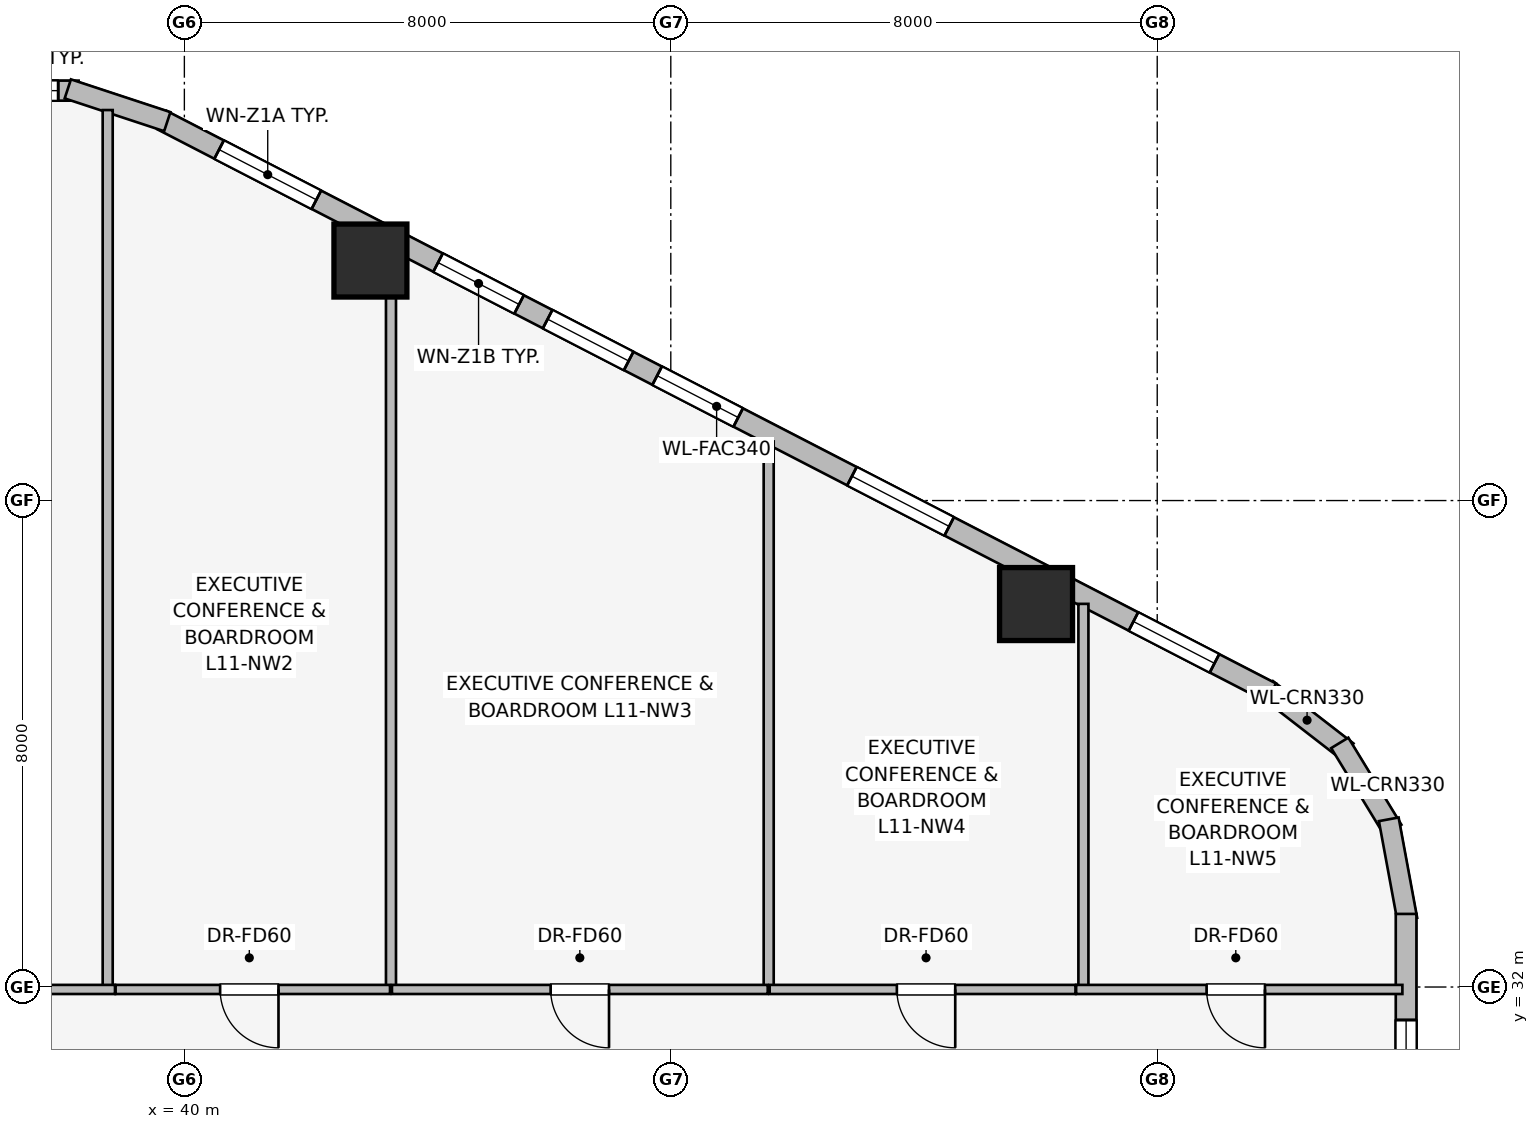
"""IFC4 building model, lengths in metres.
Left out: names, types, materials, properties, quantities, classifications, styles, units other than length and angle.
Written with IfcOpenShell. Run it as: python <this file> out.ifc"""

import sys

from ifc_helpers import new_model, si_unit, direction, frame, frame_2d, origin, origin_2d, place, context, subcontext, project, spatial, rectangle, extrude, element, fill, save


model = new_model("IFC4")
c1 = context("Model", 3, precision=1e-05, world=origin(), true_north=direction((0.0, 1.0)))
c2 = subcontext(c1, "Body", "Model", "MODEL_VIEW")
j1 = project(units=[si_unit("LENGTHUNIT", "METRE"), si_unit("PLANEANGLEUNIT", "RADIAN")], contexts=[c1])
p1 = place(None, origin())
s1 = spatial("IfcSite", under=j1, at=p1, CompositionType="ELEMENT")
p2 = place(p1, origin())
s2 = spatial("IfcBuilding", under=s1, at=p2, CompositionType="ELEMENT")
p3 = place(p2, frame((0.0, 0.0, 45.25)))
s3 = spatial("IfcBuildingStorey", under=s2, at=p3, CompositionType="ELEMENT", Elevation=45.25)
for number, where, z_axis, x_axis in (
    (1, (54.007, 38.298, 0.0), (0.0, 0.0, 1.0), (1.0, 0.0, 0.0)),
    (2, (43.06, 43.947, 0.0), (0.0, 0.0, 1.0), (1.0, 0.0, 0.0)),
):
    element("IfcColumn", number, at=place(p3, frame(where, z_axis=z_axis, x_axis=x_axis)), inside=s3, PredefinedType="COLUMN", context=c2, shape_type="SweptSolid", body=[
        extrude(rectangle(XDim=1.2, YDim=1.2, at=origin_2d()), origin(), (0.0, 0.0, 1.0), 3.65),
    ])
p4 = place(p3, frame((57.802, 36.901, 0.0), z_axis=(0.0, 0.0, 1.0), x_axis=(0.790691856293, -0.61221433207, 0.0)))
e3 = element("IfcWall", 3, at=p4, inside=s3, PredefinedType="STANDARD", context=c2, shape_type="SweptSolid", body=[
    extrude(rectangle(XDim=1.676, YDim=0.33, at=frame_2d((0.838, 0.0))), origin(), (0.0, 0.0, 1.0), 3.39),
])
p5 = place(p3, frame((59.002, 36.015, 0.0), z_axis=(0.0, 0.0, 1.0), x_axis=(0.520584129191, -0.853810379671, 0.0)))
e4 = element("IfcWall", 4, at=p5, inside=s3, PredefinedType="STANDARD", context=c2, shape_type="SweptSolid", body=[
    extrude(rectangle(XDim=1.677, YDim=0.33, at=frame_2d((0.838, 0.0))), origin(), (0.0, 0.0, 1.0), 3.39),
])
p6 = place(p3, frame((59.808, 34.758, 0.0), z_axis=(0.0, 0.0, 1.0), x_axis=(0.181714143354, -0.983351397063, 0.0)))
e5 = element("IfcWall", 5, at=p6, inside=s3, PredefinedType="STANDARD", context=c2, shape_type="SweptSolid", body=[
    extrude(rectangle(XDim=1.678, YDim=0.33, at=frame_2d((0.839, 0.0))), origin(), (0.0, 0.0, 1.0), 3.39),
])
p7 = place(p3, frame((39.631, 46.257, 0.0), z_axis=(0.0, 0.0, 1.0), x_axis=(0.888634413993, -0.458616264721, 0.0)))
e6 = element("IfcWall", 6, at=p7, inside=s3, PredefinedType="STANDARD", context=c2, shape_type="SweptSolid", body=[
    extrude(rectangle(XDim=20.531, YDim=0.34, at=frame_2d((10.266, 0.0))), origin(), (0.0, 0.0, 1.0), 2.684),
])
p8 = place(p7, frame((1.058, 0.0, 0.75)))
e7 = element("IfcOpeningElement", 7, at=p8, cuts=e6, PredefinedType="OPENING", context=c2, shape_type="SweptSolid", body=[
    extrude(rectangle(XDim=1.8, YDim=1.5, at=frame_2d((0.9, 0.75))), frame((0.0, 0.18, 0.0), z_axis=(0.0, -1.0, 0.0), x_axis=(1.0, 0.0, 0.0)), (0.0, 0.0, 1.0), 0.36),
])
p9 = place(p7, frame((5.11, 0.0, 0.75)))
e8 = element("IfcOpeningElement", 8, at=p9, cuts=e6, PredefinedType="OPENING", context=c2, shape_type="SweptSolid", body=[
    extrude(rectangle(XDim=1.5, YDim=1.5, at=frame_2d((0.75, 0.75))), frame((0.0, 0.18, 0.0), z_axis=(0.0, -1.0, 0.0), x_axis=(1.0, 0.0, 0.0)), (0.0, 0.0, 1.0), 0.36),
])
p10 = place(p7, frame((7.138, 0.0, 0.75)))
e9 = element("IfcOpeningElement", 9, at=p10, cuts=e6, PredefinedType="OPENING", context=c2, shape_type="SweptSolid", body=[
    extrude(rectangle(XDim=1.5, YDim=1.5, at=frame_2d((0.75, 0.75))), frame((0.0, 0.18, 0.0), z_axis=(0.0, -1.0, 0.0), x_axis=(1.0, 0.0, 0.0)), (0.0, 0.0, 1.0), 0.36),
])
p11 = place(p7, frame((9.165, 0.0, 0.75)))
e10 = element("IfcOpeningElement", 10, at=p11, cuts=e6, PredefinedType="OPENING", context=c2, shape_type="SweptSolid", body=[
    extrude(rectangle(XDim=1.5, YDim=1.5, at=frame_2d((0.75, 0.75))), frame((0.0, 0.18, 0.0), z_axis=(0.0, -1.0, 0.0), x_axis=(1.0, 0.0, 0.0)), (0.0, 0.0, 1.0), 0.36),
])
p12 = place(p7, frame((12.77, 0.0, 0.75)))
e11 = element("IfcOpeningElement", 11, at=p12, cuts=e6, PredefinedType="OPENING", context=c2, shape_type="SweptSolid", body=[
    extrude(rectangle(XDim=1.8, YDim=1.5, at=frame_2d((0.9, 0.75))), frame((0.0, 0.18, 0.0), z_axis=(0.0, -1.0, 0.0), x_axis=(1.0, 0.0, 0.0)), (0.0, 0.0, 1.0), 0.36),
])
p13 = place(p7, frame((17.98, 0.0, 0.75)))
e12 = element("IfcOpeningElement", 12, at=p13, cuts=e6, PredefinedType="OPENING", context=c2, shape_type="SweptSolid", body=[
    extrude(rectangle(XDim=1.5, YDim=1.5, at=frame_2d((0.75, 0.75))), frame((0.0, 0.18, 0.0), z_axis=(0.0, -1.0, 0.0), x_axis=(1.0, 0.0, 0.0)), (0.0, 0.0, 1.0), 0.36),
])
p14 = place(p3, frame((36.539, 46.741, 0.0), z_axis=(0.0, 0.0, 1.0), x_axis=(1.0, 0.0, 0.0)))
e13 = element("IfcWall", 13, at=p14, inside=s3, PredefinedType="STANDARD", context=c2, shape_type="SweptSolid", body=[
    extrude(rectangle(XDim=1.722, YDim=0.33, at=frame_2d((0.861, 0.0))), origin(), (0.0, 0.0, 1.0), 3.39),
])
p15 = place(p14, frame((0.336, 0.0, 0.75)))
e14 = element("IfcOpeningElement", 14, at=p15, cuts=e13, PredefinedType="OPENING", context=c2, shape_type="SweptSolid", body=[
    extrude(rectangle(XDim=1.05, YDim=1.4, at=frame_2d((0.525, 0.7))), frame((0.0, 0.175, 0.0), z_axis=(0.0, -1.0, 0.0), x_axis=(1.0, 0.0, 0.0)), (0.0, 0.0, 1.0), 0.35),
])
p16 = place(p3, frame((38.083, 46.77, 0.0), z_axis=(0.0, 0.0, 1.0), x_axis=(0.94976901097, -0.312951794691, 0.0)))
e15 = element("IfcWall", 15, at=p16, inside=s3, PredefinedType="STANDARD", context=c2, shape_type="SweptSolid", body=[
    extrude(rectangle(XDim=1.722, YDim=0.33, at=frame_2d((0.861, 0.0))), origin(), (0.0, 0.0, 1.0), 3.39),
])
p17 = place(p3, frame((60.093, 33.202, 0.0), z_axis=(0.0, 0.0, 1.0), x_axis=(0.0, -1.0, 0.0)))
e16 = element("IfcWall", 16, at=p17, inside=s3, PredefinedType="STANDARD", context=c2, shape_type="SweptSolid", body=[
    extrude(rectangle(XDim=18.404, YDim=0.34, at=frame_2d((9.202, 0.0))), origin(), (0.0, 0.0, 1.0), 2.684),
])
p18 = place(p17, frame((1.744, 0.0, 0.75)))
e17 = element("IfcOpeningElement", 17, at=p18, cuts=e16, PredefinedType="OPENING", context=c2, shape_type="SweptSolid", body=[
    extrude(rectangle(XDim=1.05, YDim=1.4, at=frame_2d((0.525, 0.7))), frame((0.0, 0.18, 0.0), z_axis=(0.0, -1.0, 0.0), x_axis=(1.0, 0.0, 0.0)), (0.0, 0.0, 1.0), 0.36),
])
p19 = place(p17, frame((5.182, 0.0, 0.75)))
e18 = element("IfcOpeningElement", 18, at=p19, cuts=e16, PredefinedType="OPENING", context=c2, shape_type="SweptSolid", body=[
    extrude(rectangle(XDim=1.5, YDim=1.5, at=frame_2d((0.75, 0.75))), frame((0.0, 0.18, 0.0), z_axis=(0.0, -1.0, 0.0), x_axis=(1.0, 0.0, 0.0)), (0.0, 0.0, 1.0), 0.36),
])
p20 = place(p17, frame((9.058, 0.0, 0.75)))
e19 = element("IfcOpeningElement", 19, at=p20, cuts=e16, PredefinedType="OPENING", context=c2, shape_type="SweptSolid", body=[
    extrude(rectangle(XDim=1.8, YDim=1.5, at=frame_2d((0.9, 0.75))), frame((0.0, 0.18, 0.0), z_axis=(0.0, -1.0, 0.0), x_axis=(1.0, 0.0, 0.0)), (0.0, 0.0, 1.0), 0.36),
])
p21 = place(p17, frame((12.704, 0.0, 0.75)))
e20 = element("IfcOpeningElement", 20, at=p21, cuts=e16, PredefinedType="OPENING", context=c2, shape_type="SweptSolid", body=[
    extrude(rectangle(XDim=1.05, YDim=1.4, at=frame_2d((0.525, 0.7))), frame((0.0, 0.18, 0.0), z_axis=(0.0, -1.0, 0.0), x_axis=(1.0, 0.0, 0.0)), (0.0, 0.0, 1.0), 0.36),
])
p22 = place(p17, frame((15.65, 0.0, 0.75)))
e21 = element("IfcOpeningElement", 21, at=p22, cuts=e16, PredefinedType="OPENING", context=c2, shape_type="SweptSolid", body=[
    extrude(rectangle(XDim=1.05, YDim=1.4, at=frame_2d((0.525, 0.7))), frame((0.0, 0.18, 0.0), z_axis=(0.0, -1.0, 0.0), x_axis=(1.0, 0.0, 0.0)), (0.0, 0.0, 1.0), 0.36),
])
p23 = place(p3, frame((38.739, 31.97, 0.0), z_axis=(0.0, 0.0, 1.0), x_axis=(0.0, 1.0, 0.0)))
e22 = element("IfcWall", 22, at=p23, inside=s3, PredefinedType="PARTITIONING", context=c2, shape_type="SweptSolid", body=[
    extrude(rectangle(XDim=14.452, YDim=0.165, at=frame_2d((7.226, 0.0))), origin(), (0.0, 0.0, 1.0), 3.39),
])
p24 = place(p3, frame((43.398, 31.97, 0.0), z_axis=(0.0, 0.0, 1.0), x_axis=(0.0, 1.0, 0.0)))
e23 = element("IfcWall", 23, at=p24, inside=s3, PredefinedType="PARTITIONING", context=c2, shape_type="SweptSolid", body=[
    extrude(rectangle(XDim=12.208, YDim=0.165, at=frame_2d((6.104, 0.0))), origin(), (0.0, 0.0, 1.0), 2.513),
])
p25 = place(p3, frame((49.61, 31.97, 0.0), z_axis=(0.0, 0.0, 1.0), x_axis=(0.0, 1.0, 0.0)))
e24 = element("IfcWall", 24, at=p25, inside=s3, PredefinedType="PARTITIONING", context=c2, shape_type="SweptSolid", body=[
    extrude(rectangle(XDim=9.002, YDim=0.165, at=frame_2d((4.501, 0.0))), origin(), (0.0, 0.0, 1.0), 3.39),
])
p26 = place(p3, frame((54.786, 31.97, 0.0), z_axis=(0.0, 0.0, 1.0), x_axis=(0.0, 1.0, 0.0)))
e25 = element("IfcWall", 25, at=p26, inside=s3, PredefinedType="PARTITIONING", context=c2, shape_type="SweptSolid", body=[
    extrude(rectangle(XDim=6.331, YDim=0.165, at=frame_2d((3.166, 0.0))), origin(), (0.0, 0.0, 1.0), 3.39),
])
p27 = place(p3, frame((38.859, 31.96, 0.0), z_axis=(0.0, 0.0, 1.0), x_axis=(-1.0, 0.0, 0.0)))
e26 = element("IfcWall", 26, at=p27, inside=s3, PredefinedType="PARTITIONING", context=c2, shape_type="SweptSolid", body=[
    extrude(rectangle(XDim=4.569, YDim=0.15, at=frame_2d((2.284, 0.0))), origin(), (0.0, 0.0, 1.0), 3.39),
])
p28 = place(p27, frame((1.748, 0.0, 0.0)))
e27 = element("IfcOpeningElement", 27, at=p28, cuts=e26, PredefinedType="OPENING", context=c2, shape_type="SweptSolid", body=[
    extrude(rectangle(XDim=0.96, YDim=2.0, at=frame_2d((0.48, 1.0))), frame((0.0, 0.085, 0.0), z_axis=(0.0, -1.0, 0.0), x_axis=(1.0, 0.0, 0.0)), (0.0, 0.0, 1.0), 0.17),
])
p29 = place(p3, frame((43.382, 31.96, 0.0), z_axis=(0.0, 0.0, 1.0), x_axis=(-1.0, 0.0, 0.0)))
e28 = element("IfcWall", 28, at=p29, inside=s3, PredefinedType="PARTITIONING", context=c2, shape_type="SweptSolid", body=[
    extrude(rectangle(XDim=4.513, YDim=0.15, at=frame_2d((2.257, 0.0))), origin(), (0.0, 0.0, 1.0), 3.39),
])
p30 = place(p29, frame((1.834, 0.0, 0.0)))
e29 = element("IfcOpeningElement", 29, at=p30, cuts=e28, PredefinedType="OPENING", context=c2, shape_type="SweptSolid", body=[
    extrude(rectangle(XDim=0.96, YDim=2.0, at=frame_2d((0.48, 1.0))), frame((0.0, 0.085, 0.0), z_axis=(0.0, -1.0, 0.0), x_axis=(1.0, 0.0, 0.0)), (0.0, 0.0, 1.0), 0.17),
])
p31 = place(p3, frame((49.594, 31.96, 0.0), z_axis=(0.0, 0.0, 1.0), x_axis=(-1.0, 0.0, 0.0)))
e30 = element("IfcWall", 30, at=p31, inside=s3, PredefinedType="PARTITIONING", context=c2, shape_type="SweptSolid", body=[
    extrude(rectangle(XDim=6.18, YDim=0.15, at=frame_2d((3.09, 0.0))), origin(), (0.0, 0.0, 1.0), 3.39),
])
p32 = place(p31, frame((2.61, 0.0, 0.0)))
e31 = element("IfcOpeningElement", 31, at=p32, cuts=e30, PredefinedType="OPENING", context=c2, shape_type="SweptSolid", body=[
    extrude(rectangle(XDim=0.96, YDim=2.0, at=frame_2d((0.48, 1.0))), frame((0.0, 0.085, 0.0), z_axis=(0.0, -1.0, 0.0), x_axis=(1.0, 0.0, 0.0)), (0.0, 0.0, 1.0), 0.17),
])
p33 = place(p3, frame((54.656, 31.96, 0.0), z_axis=(0.0, 0.0, 1.0), x_axis=(-1.0, 0.0, 0.0)))
e32 = element("IfcWall", 32, at=p33, inside=s3, PredefinedType="PARTITIONING", context=c2, shape_type="SweptSolid", body=[
    extrude(rectangle(XDim=5.03, YDim=0.15, at=frame_2d((2.515, 0.0))), origin(), (0.0, 0.0, 1.0), 3.39),
])
p34 = place(p33, frame((1.978, 0.0, 0.0)))
e33 = element("IfcOpeningElement", 33, at=p34, cuts=e32, PredefinedType="OPENING", context=c2, shape_type="SweptSolid", body=[
    extrude(rectangle(XDim=0.96, YDim=2.0, at=frame_2d((0.48, 1.0))), frame((0.0, 0.085, 0.0), z_axis=(0.0, -1.0, 0.0), x_axis=(1.0, 0.0, 0.0)), (0.0, 0.0, 1.0), 0.17),
])
p35 = place(p3, frame((60.032, 31.96, 0.0), z_axis=(0.0, 0.0, 1.0), x_axis=(-1.0, 0.0, 0.0)))
e34 = element("IfcWall", 34, at=p35, inside=s3, PredefinedType="PARTITIONING", context=c2, shape_type="SweptSolid", body=[
    extrude(rectangle(XDim=5.366, YDim=0.15, at=frame_2d((2.683, 0.0))), origin(), (0.0, 0.0, 1.0), 3.39),
])
p36 = place(p35, frame((2.26, 0.0, 0.0)))
e35 = element("IfcOpeningElement", 35, at=p36, cuts=e34, PredefinedType="OPENING", context=c2, shape_type="SweptSolid", body=[
    extrude(rectangle(XDim=0.96, YDim=2.0, at=frame_2d((0.48, 1.0))), frame((0.0, 0.085, 0.0), z_axis=(0.0, -1.0, 0.0), x_axis=(1.0, 0.0, 0.0)), (0.0, 0.0, 1.0), 0.17),
])
p37 = place(p8, origin())
e36 = element("IfcWindow", 36, at=p37, inside=s3, PartitioningType="SINGLE_PANEL", PredefinedType="WINDOW", context=c2, shape_type="SweptSolid", body=[
    extrude(rectangle(XDim=1.8, YDim=1.5, at=frame_2d((0.9, 0.75))), frame((0.0, 0.03, 0.0), z_axis=(0.0, -1.0, 0.0), x_axis=(1.0, 0.0, 0.0)), (0.0, 0.0, 1.0), 0.06),
])
fill(e7, e36)
p38 = place(p9, origin())
e37 = element("IfcWindow", 37, at=p38, inside=s3, PartitioningType="SINGLE_PANEL", PredefinedType="WINDOW", context=c2, shape_type="SweptSolid", body=[
    extrude(rectangle(XDim=1.5, YDim=1.5, at=frame_2d((0.75, 0.75))), frame((0.0, 0.03, 0.0), z_axis=(0.0, -1.0, 0.0), x_axis=(1.0, 0.0, 0.0)), (0.0, 0.0, 1.0), 0.06),
])
fill(e8, e37)
p39 = place(p10, origin())
e38 = element("IfcWindow", 38, at=p39, inside=s3, PartitioningType="SINGLE_PANEL", PredefinedType="WINDOW", context=c2, shape_type="SweptSolid", body=[
    extrude(rectangle(XDim=1.5, YDim=1.5, at=frame_2d((0.75, 0.75))), frame((0.0, 0.03, 0.0), z_axis=(0.0, -1.0, 0.0), x_axis=(1.0, 0.0, 0.0)), (0.0, 0.0, 1.0), 0.06),
])
fill(e9, e38)
p40 = place(p11, origin())
e39 = element("IfcWindow", 39, at=p40, inside=s3, PartitioningType="SINGLE_PANEL", PredefinedType="WINDOW", context=c2, shape_type="SweptSolid", body=[
    extrude(rectangle(XDim=1.5, YDim=1.5, at=frame_2d((0.75, 0.75))), frame((0.0, 0.03, 0.0), z_axis=(0.0, -1.0, 0.0), x_axis=(1.0, 0.0, 0.0)), (0.0, 0.0, 1.0), 0.06),
])
fill(e10, e39)
p41 = place(p12, origin())
e40 = element("IfcWindow", 40, at=p41, inside=s3, PartitioningType="SINGLE_PANEL", PredefinedType="WINDOW", context=c2, shape_type="SweptSolid", body=[
    extrude(rectangle(XDim=1.8, YDim=1.5, at=frame_2d((0.9, 0.75))), frame((0.0, 0.03, 0.0), z_axis=(0.0, -1.0, 0.0), x_axis=(1.0, 0.0, 0.0)), (0.0, 0.0, 1.0), 0.06),
])
fill(e11, e40)
p42 = place(p13, origin())
e41 = element("IfcWindow", 41, at=p42, inside=s3, PartitioningType="SINGLE_PANEL", PredefinedType="WINDOW", context=c2, shape_type="SweptSolid", body=[
    extrude(rectangle(XDim=1.5, YDim=1.5, at=frame_2d((0.75, 0.75))), frame((0.0, 0.03, 0.0), z_axis=(0.0, -1.0, 0.0), x_axis=(1.0, 0.0, 0.0)), (0.0, 0.0, 1.0), 0.06),
])
fill(e12, e41)
p43 = place(p15, origin())
e42 = element("IfcWindow", 42, at=p43, inside=s3, PartitioningType="SINGLE_PANEL", PredefinedType="WINDOW", context=c2, shape_type="SweptSolid", body=[
    extrude(rectangle(XDim=1.05, YDim=1.4, at=frame_2d((0.525, 0.7))), frame((0.0, 0.03, 0.0), z_axis=(0.0, -1.0, 0.0), x_axis=(1.0, 0.0, 0.0)), (0.0, 0.0, 1.0), 0.06),
])
fill(e14, e42)
p44 = place(p18, origin())
e43 = element("IfcWindow", 43, at=p44, inside=s3, PartitioningType="SINGLE_PANEL", PredefinedType="WINDOW", context=c2, shape_type="SweptSolid", body=[
    extrude(rectangle(XDim=1.05, YDim=1.4, at=frame_2d((0.525, 0.7))), frame((0.0, 0.03, 0.0), z_axis=(0.0, -1.0, 0.0), x_axis=(1.0, 0.0, 0.0)), (0.0, 0.0, 1.0), 0.06),
])
fill(e17, e43)
p45 = place(p30, origin())
e44 = element("IfcDoor", 44, at=p45, inside=s3, OperationType="SINGLE_SWING_LEFT", PredefinedType="DOOR", context=c2, shape_type="SweptSolid", body=[
    extrude(rectangle(XDim=0.96, YDim=2.0, at=frame_2d((0.48, 1.0))), frame((0.0, 0.025, 0.0), z_axis=(0.0, -1.0, 0.0), x_axis=(1.0, 0.0, 0.0)), (0.0, 0.0, 1.0), 0.05),
])
fill(e29, e44)
p46 = place(p32, origin())
e45 = element("IfcDoor", 45, at=p46, inside=s3, OperationType="SINGLE_SWING_LEFT", PredefinedType="DOOR", context=c2, shape_type="SweptSolid", body=[
    extrude(rectangle(XDim=0.96, YDim=2.0, at=frame_2d((0.48, 1.0))), frame((0.0, 0.025, 0.0), z_axis=(0.0, -1.0, 0.0), x_axis=(1.0, 0.0, 0.0)), (0.0, 0.0, 1.0), 0.05),
])
fill(e31, e45)
p47 = place(p34, origin())
e46 = element("IfcDoor", 46, at=p47, inside=s3, OperationType="SINGLE_SWING_LEFT", PredefinedType="DOOR", context=c2, shape_type="SweptSolid", body=[
    extrude(rectangle(XDim=0.96, YDim=2.0, at=frame_2d((0.48, 1.0))), frame((0.0, 0.025, 0.0), z_axis=(0.0, -1.0, 0.0), x_axis=(1.0, 0.0, 0.0)), (0.0, 0.0, 1.0), 0.05),
])
fill(e33, e46)
p48 = place(p36, origin())
e47 = element("IfcDoor", 47, at=p48, inside=s3, OperationType="SINGLE_SWING_LEFT", PredefinedType="DOOR", context=c2, shape_type="SweptSolid", body=[
    extrude(rectangle(XDim=0.96, YDim=2.0, at=frame_2d((0.48, 1.0))), frame((0.0, 0.025, 0.0), z_axis=(0.0, -1.0, 0.0), x_axis=(1.0, 0.0, 0.0)), (0.0, 0.0, 1.0), 0.05),
])
fill(e35, e47)
save(model, sys.argv[1])
